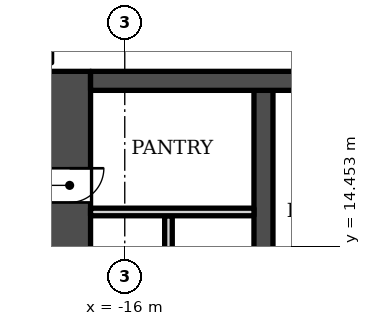
"""IFC4 building model, lengths in metres.
Left out: names, types, materials, properties, quantities, classifications, styles, units other than length and angle.
Written with IfcOpenShell. Run it as: python <this file> out.ifc"""

import sys

from ifc_helpers import new_model, si_unit, direction, frame, frame_2d, origin, place, context, subcontext, project, spatial, rectangle, extrude, element, fill, save


model = new_model("IFC4")
c1 = context("Model", 3, precision=1e-05, world=origin(), true_north=direction((0.0, 1.0)))
c2 = subcontext(c1, "Body", "Model", "MODEL_VIEW")
j1 = project(units=[si_unit("LENGTHUNIT", "METRE"), si_unit("PLANEANGLEUNIT", "RADIAN")], contexts=[c1])
p1 = place(None, origin())
s1 = spatial("IfcSite", under=j1, at=p1, CompositionType="ELEMENT")
p2 = place(p1, origin())
s2 = spatial("IfcBuilding", under=s1, at=p2, CompositionType="ELEMENT")
p3 = place(p2, origin())
s3 = spatial("IfcBuildingStorey", under=s2, at=p3, CompositionType="ELEMENT", Elevation=0.0)
p4 = place(p3, frame((-16.9, 18.802, 0.0), z_axis=(0.0, 0.0, 1.0), x_axis=(1.0, 0.0, 0.0)))
e1 = element("IfcWall", 1, at=p4, inside=s3, PredefinedType="SHEAR", context=c2, shape_type="SweptSolid", body=[
    extrude(rectangle(XDim=33.8, YDim=0.5, at=frame_2d((16.9, 0.0))), origin(), (0.0, 0.0, 1.0), 9.0),
])
p5 = place(p4, frame((14.05, 0.0, 0.0)))
e2 = element("IfcOpeningElement", 2, at=p5, cuts=e1, PredefinedType="OPENING", context=c2, shape_type="SweptSolid", body=[
    extrude(rectangle(XDim=1.2, YDim=2.1, at=frame_2d((0.6, 1.05))), frame((0.0, 0.26, 0.0), z_axis=(0.0, -1.0, 0.0), x_axis=(1.0, 0.0, 0.0)), (0.0, 0.0, 1.0), 0.52),
])
p6 = place(p3, frame((-12.35, 5.253, 0.0), z_axis=(0.0, 0.0, 1.0), x_axis=(0.0, 1.0, 0.0)))
e3 = element("IfcWall", 3, at=p6, inside=s3, PredefinedType="SHEAR", context=c2, shape_type="SweptSolid", body=[
    extrude(rectangle(XDim=13.3, YDim=0.5, at=frame_2d((6.65, 0.0))), origin(), (0.0, 0.0, 1.0), 9.0),
])
p7 = place(p3, frame((-17.45, 5.853, 0.0), z_axis=(0.0, 0.0, 1.0), x_axis=(0.0, 1.0, 0.0)))
e4 = element("IfcWall", 4, at=p7, inside=s3, PredefinedType="SHEAR", context=c2, shape_type="SweptSolid", body=[
    extrude(rectangle(XDim=13.2, YDim=1.1, at=frame_2d((6.6, 0.0))), origin(), (0.0, 0.0, 1.0), 9.0),
])
p8 = place(p7, frame((4.1, 0.0, 0.0)))
e5 = element("IfcOpeningElement", 5, at=p8, cuts=e4, PredefinedType="OPENING", context=c2, shape_type="SweptSolid", body=[
    extrude(rectangle(XDim=1.6, YDim=2.1, at=frame_2d((0.8, 1.05))), frame((0.0, 0.56, 0.0), z_axis=(0.0, -1.0, 0.0), x_axis=(1.0, 0.0, 0.0)), (0.0, 0.0, 1.0), 1.12),
])
p9 = place(p7, frame((9.75, 0.0, 0.0)))
e6 = element("IfcOpeningElement", 6, at=p9, cuts=e4, PredefinedType="OPENING", context=c2, shape_type="SweptSolid", body=[
    extrude(rectangle(XDim=0.9, YDim=2.1, at=frame_2d((0.45, 1.05))), frame((0.0, 0.56, 0.0), z_axis=(0.0, -1.0, 0.0), x_axis=(1.0, 0.0, 0.0)), (0.0, 0.0, 1.0), 1.12),
])
p10 = place(p3, frame((-14.85, 12.653, 0.0), z_axis=(0.0, 0.0, 1.0), x_axis=(0.0, 1.0, 0.0)))
e7 = element("IfcWall", 7, at=p10, inside=s3, PredefinedType="SOLIDWALL", context=c2, shape_type="SweptSolid", body=[
    extrude(rectangle(XDim=2.6, YDim=0.2, at=frame_2d((1.3, 0.0))), origin(), (0.0, 0.0, 1.0), 8.5),
])
p11 = place(p3, frame((-16.9, 15.353, 0.0), z_axis=(0.0, 0.0, 1.0), x_axis=(1.0, 0.0, 0.0)))
e8 = element("IfcWall", 8, at=p11, inside=s3, PredefinedType="SOLIDWALL", context=c2, shape_type="SweptSolid", body=[
    extrude(rectangle(XDim=4.3, YDim=0.2, at=frame_2d((2.15, 0.0))), origin(), (0.0, 0.0, 1.0), 8.5),
])
p12 = place(p9, origin())
e9 = element("IfcDoor", 9, at=p12, inside=s3, OperationType="SINGLE_SWING_RIGHT", PredefinedType="DOOR", context=c2, shape_type="SweptSolid", body=[
    extrude(rectangle(XDim=0.9, YDim=2.1, at=frame_2d((0.45, 1.05))), frame((0.0, -0.225, 0.0), z_axis=(0.0, -1.0, 0.0), x_axis=(1.0, 0.0, 0.0)), (0.0, 0.0, 1.0), 0.05),
])
fill(e6, e9)
save(model, sys.argv[1])
